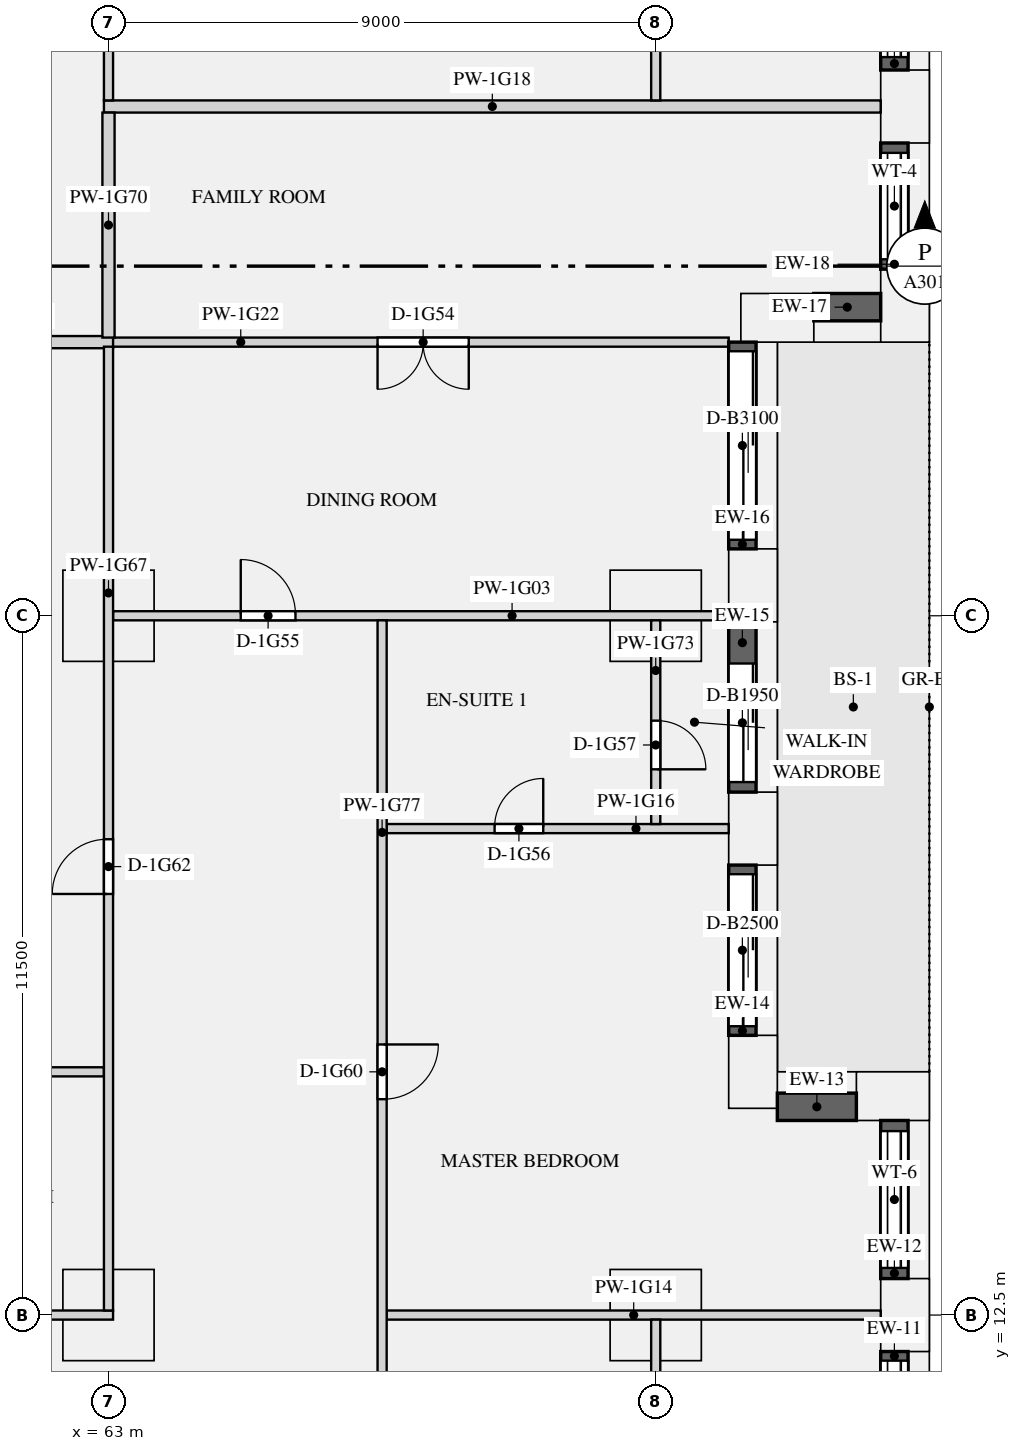
"""IFC4 building model, lengths in metres.
Left out: names, types, materials, properties, quantities, classifications, styles, units other than length and angle.
Written with IfcOpenShell. Run it as: python <this file> out.ifc"""

import sys

from ifc_helpers import new_model, si_unit, direction, frame, frame_2d, origin, origin_2d, place, context, subcontext, project, spatial, rectangle, extrude, element, fill, save


model = new_model("IFC4")
c1 = context("Model", 3, precision=1e-05, world=origin(), true_north=direction((0.0, 1.0)))
c2 = subcontext(c1, "Body", "Model", "MODEL_VIEW")
j1 = project(units=[si_unit("LENGTHUNIT", "METRE"), si_unit("PLANEANGLEUNIT", "RADIAN")], contexts=[c1])
p1 = place(None, origin())
s1 = spatial("IfcSite", under=j1, at=p1, CompositionType="ELEMENT")
p2 = place(p1, origin())
s2 = spatial("IfcBuilding", under=s1, at=p2, CompositionType="ELEMENT")
p3 = place(p2, frame((0.0, 0.0, 69.9)))
s3 = spatial("IfcBuildingStorey", under=s2, at=p3, CompositionType="ELEMENT", Elevation=69.9)
for number, where, z_axis, x_axis in (
    (1, (76.1, 12.5, 0.0), (0.0, 0.0, 1.0), (0.0, 1.0, 0.0)),
    (2, (75.9, 16.1, 0.0), (0.0, 0.0, 1.0), (-1.0, 0.0, 0.0)),
    (3, (73.6, 16.5, 0.0), (0.0, 0.0, 1.0), (0.0, 1.0, 0.0)),
    (4, (73.6, 20.5, 0.0), (0.0, 0.0, 1.0), (0.0, 1.0, 0.0)),
    (5, (73.6, 24.5, 0.0), (0.0, 0.0, 1.0), (0.0, 1.0, 0.0)),
    (6, (74.0, 28.9, 0.0), (0.0, 0.0, 1.0), (1.0, 0.0, 0.0)),
    (7, (76.1, 29.1, 0.0), (0.0, 0.0, 1.0), (0.0, 1.0, 0.0)),
):
    element("IfcColumn", number, at=place(p3, frame(where, z_axis=z_axis, x_axis=x_axis)), inside=s3, PredefinedType="USERDEFINED", context=c2, shape_type="SweptSolid", body=[
        extrude(rectangle(XDim=1.2, YDim=0.8, at=origin_2d()), origin(), (0.0, 0.0, 1.0), 3.15),
    ])
p4 = place(p3, frame((76.1, 32.375, 0.0), z_axis=(0.0, 0.0, 1.0), x_axis=(0.0, 1.0, 0.0)))
e8 = element("IfcColumn", 8, at=p4, inside=s3, PredefinedType="USERDEFINED", context=c2, shape_type="SweptSolid", body=[
    extrude(rectangle(XDim=1.2, YDim=0.8, at=origin_2d()), origin(), (0.0, 0.0, 1.0), 2.65),
])
for number, where, z_axis, x_axis in (
    (9, (63.0, 24.0, 0.0), (0.0, 0.0, 1.0), (1.0, 0.0, 0.0)),
    (10, (72.0, 24.0, 0.0), (0.0, 0.0, 1.0), (1.0, 0.0, 0.0)),
    (11, (63.0, 12.5, 0.0), (0.0, 0.0, 1.0), (1.0, 0.0, 0.0)),
    (12, (72.0, 12.5, 0.0), (0.0, 0.0, 1.0), (1.0, 0.0, 0.0)),
):
    element("IfcColumn", number, at=place(p3, frame(where, z_axis=z_axis, x_axis=x_axis)), inside=s3, PredefinedType="COLUMN", context=c2, shape_type="SweptSolid", body=[
        extrude(rectangle(XDim=1.5, YDim=1.5, at=origin_2d()), origin(), (0.0, 0.0, 1.0), 3.15),
    ])
p5 = place(p3, frame((75.925, 9.1, 0.9), z_axis=(0.0, 0.0, 1.0), x_axis=(0.0, 1.0, 0.0)))
e13 = element("IfcWall", 13, at=p5, inside=s3, PredefinedType="SOLIDWALL", context=c2, shape_type="SweptSolid", body=[
    extrude(rectangle(XDim=2.8, YDim=0.45, at=frame_2d((1.4, 0.0))), origin(), (0.0, 0.0, 1.0), 1.75),
])
p6 = place(p5, frame((0.15, 0.0, 0.15)))
e14 = element("IfcOpeningElement", 14, at=p6, cuts=e13, PredefinedType="OPENING", context=c2, shape_type="SweptSolid", body=[
    extrude(rectangle(XDim=2.5, YDim=1.5, at=frame_2d((1.25, 0.75))), frame((0.0, 0.235, 0.0), z_axis=(0.0, -1.0, 0.0), x_axis=(1.0, 0.0, 0.0)), (0.0, 0.0, 1.0), 0.47),
])
p7 = place(p3, frame((75.925, 13.1, 0.9), z_axis=(0.0, 0.0, 1.0), x_axis=(0.0, 1.0, 0.0)))
e15 = element("IfcWall", 15, at=p7, inside=s3, PredefinedType="SOLIDWALL", context=c2, shape_type="SweptSolid", body=[
    extrude(rectangle(XDim=2.6, YDim=0.45, at=frame_2d((1.3, 0.0))), origin(), (0.0, 0.0, 1.0), 1.75),
])
p8 = place(p7, frame((0.175, 0.0, 0.15)))
e16 = element("IfcOpeningElement", 16, at=p8, cuts=e15, PredefinedType="OPENING", context=c2, shape_type="SweptSolid", body=[
    extrude(rectangle(XDim=2.25, YDim=1.5, at=frame_2d((1.125, 0.75))), frame((0.0, 0.235, 0.0), z_axis=(0.0, -1.0, 0.0), x_axis=(1.0, 0.0, 0.0)), (0.0, 0.0, 1.0), 0.47),
])
p9 = place(p3, frame((75.3, 15.925, 0.9), z_axis=(0.0, 0.0, 1.0), x_axis=(-1.0, 0.0, 0.0)))
e17 = element("IfcWall", 17, at=p9, inside=s3, PredefinedType="SOLIDWALL", context=c2, shape_type="SweptSolid", body=[
    extrude(rectangle(XDim=1.3, YDim=0.45, at=frame_2d((0.65, 0.0))), origin(), (0.0, 0.0, 1.0), 1.75),
])
p10 = place(p3, frame((73.425, 17.1, 0.0), z_axis=(0.0, 0.0, 1.0), x_axis=(0.0, 1.0, 0.0)))
e18 = element("IfcWall", 18, at=p10, inside=s3, PredefinedType="SOLIDWALL", context=c2, shape_type="SweptSolid", body=[
    extrude(rectangle(XDim=2.8, YDim=0.45, at=frame_2d((1.4, 0.0))), origin(), (0.0, 0.0, 1.0), 2.65),
])
p11 = place(p10, frame((0.15, 0.0, 0.0)))
e19 = element("IfcOpeningElement", 19, at=p11, cuts=e18, PredefinedType="OPENING", context=c2, shape_type="SweptSolid", body=[
    extrude(rectangle(XDim=2.5, YDim=2.3, at=frame_2d((1.25, 1.15))), frame((0.0, 0.235, 0.0), z_axis=(0.0, -1.0, 0.0), x_axis=(1.0, 0.0, 0.0)), (0.0, 0.0, 1.0), 0.47),
])
p12 = place(p3, frame((73.425, 21.1, 0.0), z_axis=(0.0, 0.0, 1.0), x_axis=(0.0, 1.0, 0.0)))
e20 = element("IfcWall", 20, at=p12, inside=s3, PredefinedType="SOLIDWALL", context=c2, shape_type="SweptSolid", body=[
    extrude(rectangle(XDim=2.8, YDim=0.45, at=frame_2d((1.4, 0.0))), origin(), (0.0, 0.0, 1.0), 2.65),
])
p13 = place(p12, frame((0.165, 0.0, 0.0)))
e21 = element("IfcOpeningElement", 21, at=p13, cuts=e20, PredefinedType="OPENING", context=c2, shape_type="SweptSolid", body=[
    extrude(rectangle(XDim=1.95, YDim=2.3, at=frame_2d((0.975, 1.15))), frame((0.0, 0.235, 0.0), z_axis=(0.0, -1.0, 0.0), x_axis=(1.0, 0.0, 0.0)), (0.0, 0.0, 1.0), 0.47),
])
p14 = place(p3, frame((73.425, 25.1, 0.0), z_axis=(0.0, 0.0, 1.0), x_axis=(0.0, 1.0, 0.0)))
e22 = element("IfcWall", 22, at=p14, inside=s3, PredefinedType="SOLIDWALL", context=c2, shape_type="SweptSolid", body=[
    extrude(rectangle(XDim=3.4, YDim=0.45, at=frame_2d((1.7, 0.0))), origin(), (0.0, 0.0, 1.0), 2.65),
])
p15 = place(p14, frame((0.15, 0.0, 0.0)))
e23 = element("IfcOpeningElement", 23, at=p15, cuts=e22, PredefinedType="OPENING", context=c2, shape_type="SweptSolid", body=[
    extrude(rectangle(XDim=3.1, YDim=2.3, at=frame_2d((1.55, 1.15))), frame((0.0, 0.235, 0.0), z_axis=(0.0, -1.0, 0.0), x_axis=(1.0, 0.0, 0.0)), (0.0, 0.0, 1.0), 0.47),
])
p16 = place(p3, frame((74.6, 29.075, 0.9), z_axis=(0.0, 0.0, 1.0), x_axis=(1.0, 0.0, 0.0)))
e24 = element("IfcWall", 24, at=p16, inside=s3, PredefinedType="SOLIDWALL", context=c2, shape_type="SweptSolid", body=[
    extrude(rectangle(XDim=1.1, YDim=0.45, at=frame_2d((0.55, 0.0))), origin(), (0.0, 0.0, 1.0), 1.75),
])
p17 = place(p3, frame((75.925, 29.7, 0.9), z_axis=(0.0, 0.0, 1.0), x_axis=(0.0, 1.0, 0.0)))
e25 = element("IfcWall", 25, at=p17, inside=s3, PredefinedType="SOLIDWALL", context=c2, shape_type="SweptSolid", body=[
    extrude(rectangle(XDim=2.075, YDim=0.45, at=frame_2d((1.038, 0.0))), origin(), (0.0, 0.0, 1.0), 1.75),
])
p18 = place(p17, frame((0.163, 0.0, 0.15)))
e26 = element("IfcOpeningElement", 26, at=p18, cuts=e25, PredefinedType="OPENING", context=c2, shape_type="SweptSolid", body=[
    extrude(rectangle(XDim=1.75, YDim=1.5, at=frame_2d((0.875, 0.75))), frame((0.0, 0.235, 0.0), z_axis=(0.0, -1.0, 0.0), x_axis=(1.0, 0.0, 0.0)), (0.0, 0.0, 1.0), 0.47),
])
p19 = place(p3, frame((75.925, 32.975, 0.9), z_axis=(0.0, 0.0, 1.0), x_axis=(0.0, 1.0, 0.0)))
e27 = element("IfcWall", 27, at=p19, inside=s3, PredefinedType="SOLIDWALL", context=c2, shape_type="SweptSolid", body=[
    extrude(rectangle(XDim=2.675, YDim=0.45, at=frame_2d((1.337, 0.0))), origin(), (0.0, 0.0, 1.0), 1.75),
])
p20 = place(p19, frame((0.212, 0.0, 0.15)))
e28 = element("IfcOpeningElement", 28, at=p20, cuts=e27, PredefinedType="OPENING", context=c2, shape_type="SweptSolid", body=[
    extrude(rectangle(XDim=2.25, YDim=1.5, at=frame_2d((1.125, 0.75))), frame((0.0, 0.235, 0.0), z_axis=(0.0, -1.0, 0.0), x_axis=(1.0, 0.0, 0.0)), (0.0, 0.0, 1.0), 0.47),
])
p21 = place(p3, frame((63.075, 24.0, 0.0), z_axis=(0.0, 0.0, 1.0), x_axis=(1.0, 0.0, 0.0)))
e29 = element("IfcWall", 29, at=p21, inside=s3, PredefinedType="PARTITIONING", context=c2, shape_type="SweptSolid", body=[
    extrude(rectangle(XDim=10.125, YDim=0.15, at=frame_2d((5.062, 0.0))), origin(), (0.0, 0.0, 1.0), 2.65),
])
p22 = place(p21, frame((2.1, 0.0, 0.0)))
e30 = element("IfcOpeningElement", 30, at=p22, cuts=e29, PredefinedType="OPENING", context=c2, shape_type="SweptSolid", body=[
    extrude(rectangle(XDim=0.9, YDim=2.1, at=frame_2d((0.45, 1.05))), frame((0.0, 0.085, 0.0), z_axis=(0.0, -1.0, 0.0), x_axis=(1.0, 0.0, 0.0)), (0.0, 0.0, 1.0), 0.17),
])
p23 = place(p3, frame((58.425, 12.5, 0.0), z_axis=(0.0, 0.0, 1.0), x_axis=(1.0, 0.0, 0.0)))
e31 = element("IfcWall", 31, at=p23, inside=s3, PredefinedType="PARTITIONING", context=c2, shape_type="SweptSolid", body=[
    extrude(rectangle(XDim=4.65, YDim=0.15, at=frame_2d((2.325, 0.0))), origin(), (0.0, 0.0, 1.0), 2.65),
])
p24 = place(p3, frame((67.575, 12.5, 0.0), z_axis=(0.0, 0.0, 1.0), x_axis=(1.0, 0.0, 0.0)))
e32 = element("IfcWall", 32, at=p24, inside=s3, PredefinedType="PARTITIONING", context=c2, shape_type="SweptSolid", body=[
    extrude(rectangle(XDim=8.125, YDim=0.15, at=frame_2d((4.062, 0.0))), origin(), (0.0, 0.0, 1.0), 2.65),
])
p25 = place(p3, frame((67.575, 20.5, 0.0), z_axis=(0.0, 0.0, 1.0), x_axis=(1.0, 0.0, 0.0)))
e33 = element("IfcWall", 33, at=p25, inside=s3, PredefinedType="PARTITIONING", context=c2, shape_type="SweptSolid", body=[
    extrude(rectangle(XDim=5.625, YDim=0.15, at=frame_2d((2.812, 0.0))), origin(), (0.0, 0.0, 1.0), 2.65),
])
p26 = place(p25, frame((1.775, 0.0, 0.0)))
e34 = element("IfcOpeningElement", 34, at=p26, cuts=e33, PredefinedType="OPENING", context=c2, shape_type="SweptSolid", body=[
    extrude(rectangle(XDim=0.8, YDim=2.1, at=frame_2d((0.4, 1.05))), frame((0.0, 0.085, 0.0), z_axis=(0.0, -1.0, 0.0), x_axis=(1.0, 0.0, 0.0)), (0.0, 0.0, 1.0), 0.17),
])
p27 = place(p3, frame((62.925, 32.375, 0.0), z_axis=(0.0, 0.0, 1.0), x_axis=(1.0, 0.0, 0.0)))
e35 = element("IfcWall", 35, at=p27, inside=s3, PredefinedType="PARTITIONING", context=c2, shape_type="SweptSolid", body=[
    extrude(rectangle(XDim=12.775, YDim=0.2, at=frame_2d((6.387, 0.0))), origin(), (0.0, 0.0, 1.0), 2.65),
])
p28 = place(p3, frame((58.575, 16.5, 0.0), z_axis=(0.0, 0.0, 1.0), x_axis=(1.0, 0.0, 0.0)))
e36 = element("IfcWall", 36, at=p28, inside=s3, PredefinedType="PARTITIONING", context=c2, shape_type="SweptSolid", body=[
    extrude(rectangle(XDim=4.35, YDim=0.15, at=frame_2d((2.175, 0.0))), origin(), (0.0, 0.0, 1.0), 2.65),
])
p29 = place(p3, frame((62.925, 28.5, 0.0), z_axis=(0.0, 0.0, 1.0), x_axis=(1.0, 0.0, 0.0)))
e37 = element("IfcWall", 37, at=p29, inside=s3, PredefinedType="PARTITIONING", context=c2, shape_type="SweptSolid", body=[
    extrude(rectangle(XDim=10.275, YDim=0.15, at=frame_2d((5.137, 0.0))), origin(), (0.0, 0.0, 1.0), 2.65),
])
p30 = place(p29, frame((4.5, 0.0, 0.0)))
e38 = element("IfcOpeningElement", 38, at=p30, cuts=e37, PredefinedType="OPENING", context=c2, shape_type="SweptSolid", body=[
    extrude(rectangle(XDim=1.5, YDim=2.1, at=frame_2d((0.75, 1.05))), frame((0.0, 0.085, 0.0), z_axis=(0.0, -1.0, 0.0), x_axis=(1.0, 0.0, 0.0)), (0.0, 0.0, 1.0), 0.17),
])
p31 = place(p3, frame((59.8, 28.5, 0.0), z_axis=(0.0, 0.0, 1.0), x_axis=(1.0, 0.0, 0.0)))
e39 = element("IfcWall", 39, at=p31, inside=s3, PredefinedType="PARTITIONING", context=c2, shape_type="SweptSolid", body=[
    extrude(rectangle(XDim=3.275, YDim=0.2, at=frame_2d((1.637, 0.0))), origin(), (0.0, 0.0, 1.0), 2.65),
])
p32 = place(p3, frame((63.0, 12.575, 0.0), z_axis=(0.0, 0.0, 1.0), x_axis=(0.0, 1.0, 0.0)))
e40 = element("IfcWall", 40, at=p32, inside=s3, PredefinedType="PARTITIONING", context=c2, shape_type="SweptSolid", body=[
    extrude(rectangle(XDim=15.85, YDim=0.15, at=frame_2d((7.925, 0.0))), origin(), (0.0, 0.0, 1.0), 2.65),
])
p33 = place(p32, frame((6.85, 0.0, 0.0)))
e41 = element("IfcOpeningElement", 41, at=p33, cuts=e40, PredefinedType="OPENING", context=c2, shape_type="SweptSolid", body=[
    extrude(rectangle(XDim=0.9, YDim=2.1, at=frame_2d((0.45, 1.05))), frame((0.0, 0.085, 0.0), z_axis=(0.0, -1.0, 0.0), x_axis=(1.0, 0.0, 0.0)), (0.0, 0.0, 1.0), 0.17),
])
p34 = place(p3, frame((63.0, 32.475, 0.0), z_axis=(0.0, 0.0, 1.0), x_axis=(0.0, 1.0, 0.0)))
e42 = element("IfcWall", 42, at=p34, inside=s3, PredefinedType="PARTITIONING", context=c2, shape_type="SweptSolid", body=[
    extrude(rectangle(XDim=7.575, YDim=0.15, at=frame_2d((3.788, 0.0))), origin(), (0.0, 0.0, 1.0), 2.65),
])
p35 = place(p3, frame((63.0, 28.575, 0.0), z_axis=(0.0, 0.0, 1.0), x_axis=(0.0, 1.0, 0.0)))
e43 = element("IfcWall", 43, at=p35, inside=s3, PredefinedType="PARTITIONING", context=c2, shape_type="SweptSolid", body=[
    extrude(rectangle(XDim=3.7, YDim=0.2, at=frame_2d((1.85, 0.0))), origin(), (0.0, 0.0, 1.0), 2.65),
])
p36 = place(p3, frame((72.0, 8.575, 0.0), z_axis=(0.0, 0.0, 1.0), x_axis=(0.0, 1.0, 0.0)))
e44 = element("IfcWall", 44, at=p36, inside=s3, PredefinedType="PARTITIONING", context=c2, shape_type="SweptSolid", body=[
    extrude(rectangle(XDim=3.85, YDim=0.15, at=frame_2d((1.925, 0.0))), origin(), (0.0, 0.0, 1.0), 2.65),
])
p37 = place(p3, frame((72.0, 20.575, 0.0), z_axis=(0.0, 0.0, 1.0), x_axis=(0.0, 1.0, 0.0)))
e45 = element("IfcWall", 45, at=p37, inside=s3, PredefinedType="PARTITIONING", context=c2, shape_type="SweptSolid", body=[
    extrude(rectangle(XDim=3.35, YDim=0.15, at=frame_2d((1.675, 0.0))), origin(), (0.0, 0.0, 1.0), 2.65),
])
p38 = place(p37, frame((0.9, 0.0, 0.0)))
e46 = element("IfcOpeningElement", 46, at=p38, cuts=e45, PredefinedType="OPENING", context=c2, shape_type="SweptSolid", body=[
    extrude(rectangle(XDim=0.8, YDim=2.1, at=frame_2d((0.4, 1.05))), frame((0.0, 0.085, 0.0), z_axis=(0.0, -1.0, 0.0), x_axis=(1.0, 0.0, 0.0)), (0.0, 0.0, 1.0), 0.17),
])
p39 = place(p3, frame((72.0, 32.475, 0.0), z_axis=(0.0, 0.0, 1.0), x_axis=(0.0, 1.0, 0.0)))
e47 = element("IfcWall", 47, at=p39, inside=s3, PredefinedType="PARTITIONING", context=c2, shape_type="SweptSolid", body=[
    extrude(rectangle(XDim=7.575, YDim=0.15, at=frame_2d((3.788, 0.0))), origin(), (0.0, 0.0, 1.0), 2.65),
])
p40 = place(p39, frame((4.963, 0.0, 0.0)))
e48 = element("IfcOpeningElement", 48, at=p40, cuts=e47, PredefinedType="OPENING", context=c2, shape_type="SweptSolid", body=[
    extrude(rectangle(XDim=1.5, YDim=2.1, at=frame_2d((0.75, 1.05))), frame((0.0, 0.085, 0.0), z_axis=(0.0, -1.0, 0.0), x_axis=(1.0, 0.0, 0.0)), (0.0, 0.0, 1.0), 0.17),
])
p41 = place(p3, frame((67.5, 8.575, 0.0), z_axis=(0.0, 0.0, 1.0), x_axis=(0.0, 1.0, 0.0)))
e49 = element("IfcWall", 49, at=p41, inside=s3, PredefinedType="PARTITIONING", context=c2, shape_type="SweptSolid", body=[
    extrude(rectangle(XDim=15.35, YDim=0.15, at=frame_2d((7.675, 0.0))), origin(), (0.0, 0.0, 1.0), 2.65),
])
p42 = place(p41, frame((7.475, 0.0, 0.0)))
e50 = element("IfcOpeningElement", 50, at=p42, cuts=e49, PredefinedType="OPENING", context=c2, shape_type="SweptSolid", body=[
    extrude(rectangle(XDim=0.9, YDim=2.1, at=frame_2d((0.45, 1.05))), frame((0.0, 0.085, 0.0), z_axis=(0.0, -1.0, 0.0), x_axis=(1.0, 0.0, 0.0)), (0.0, 0.0, 1.0), 0.17),
])
p43 = place(p41, frame((1.475, 0.0, 0.0)))
e51 = element("IfcOpeningElement", 51, at=p43, cuts=e49, PredefinedType="OPENING", context=c2, shape_type="SweptSolid", body=[
    extrude(rectangle(XDim=0.9, YDim=2.1, at=frame_2d((0.45, 1.05))), frame((0.0, 0.085, 0.0), z_axis=(0.0, -1.0, 0.0), x_axis=(1.0, 0.0, 0.0)), (0.0, 0.0, 1.0), 0.17),
])
p44 = place(p6, origin())
e52 = element("IfcWindow", 52, at=p44, inside=s3, PartitioningType="SINGLE_PANEL", PredefinedType="WINDOW", context=c2, shape_type="SweptSolid", body=[
    extrude(rectangle(XDim=2.5, YDim=1.5, at=frame_2d((1.25, 0.75))), frame((0.0, -0.065, 0.0), z_axis=(0.0, -1.0, 0.0), x_axis=(1.0, 0.0, 0.0)), (0.0, 0.0, 1.0), 0.06),
])
fill(e14, e52)
p45 = place(p8, origin())
e53 = element("IfcWindow", 53, at=p45, inside=s3, PartitioningType="SINGLE_PANEL", PredefinedType="WINDOW", context=c2, shape_type="SweptSolid", body=[
    extrude(rectangle(XDim=2.25, YDim=1.5, at=frame_2d((1.125, 0.75))), frame((0.0, -0.065, 0.0), z_axis=(0.0, -1.0, 0.0), x_axis=(1.0, 0.0, 0.0)), (0.0, 0.0, 1.0), 0.06),
])
fill(e16, e53)
p46 = place(p11, origin())
e54 = element("IfcDoor", 54, at=p46, inside=s3, OperationType="SLIDING_TO_LEFT", PredefinedType="DOOR", context=c2, shape_type="SweptSolid", body=[
    extrude(rectangle(XDim=2.5, YDim=2.3, at=frame_2d((1.25, 1.15))), frame((0.0, -0.07, 0.0), z_axis=(0.0, -1.0, 0.0), x_axis=(1.0, 0.0, 0.0)), (0.0, 0.0, 1.0), 0.05),
])
fill(e19, e54)
p47 = place(p13, origin())
e55 = element("IfcDoor", 55, at=p47, inside=s3, OperationType="SLIDING_TO_LEFT", PredefinedType="DOOR", context=c2, shape_type="SweptSolid", body=[
    extrude(rectangle(XDim=1.95, YDim=2.3, at=frame_2d((0.975, 1.15))), frame((0.0, -0.07, 0.0), z_axis=(0.0, -1.0, 0.0), x_axis=(1.0, 0.0, 0.0)), (0.0, 0.0, 1.0), 0.05),
])
fill(e21, e55)
p48 = place(p15, origin())
e56 = element("IfcDoor", 56, at=p48, inside=s3, OperationType="SLIDING_TO_LEFT", PredefinedType="DOOR", context=c2, shape_type="SweptSolid", body=[
    extrude(rectangle(XDim=3.1, YDim=2.3, at=frame_2d((1.55, 1.15))), frame((0.0, -0.07, 0.0), z_axis=(0.0, -1.0, 0.0), x_axis=(1.0, 0.0, 0.0)), (0.0, 0.0, 1.0), 0.05),
])
fill(e23, e56)
p49 = place(p18, origin())
e57 = element("IfcWindow", 57, at=p49, inside=s3, PartitioningType="SINGLE_PANEL", PredefinedType="WINDOW", context=c2, shape_type="SweptSolid", body=[
    extrude(rectangle(XDim=1.75, YDim=1.5, at=frame_2d((0.875, 0.75))), frame((0.0, -0.065, 0.0), z_axis=(0.0, -1.0, 0.0), x_axis=(1.0, 0.0, 0.0)), (0.0, 0.0, 1.0), 0.06),
])
fill(e26, e57)
p50 = place(p20, origin())
e58 = element("IfcWindow", 58, at=p50, inside=s3, PartitioningType="SINGLE_PANEL", PredefinedType="WINDOW", context=c2, shape_type="SweptSolid", body=[
    extrude(rectangle(XDim=2.25, YDim=1.5, at=frame_2d((1.125, 0.75))), frame((0.0, -0.065, 0.0), z_axis=(0.0, -1.0, 0.0), x_axis=(1.0, 0.0, 0.0)), (0.0, 0.0, 1.0), 0.06),
])
fill(e28, e58)
p51 = place(p30, frame((1.5, 0.0, 0.0), z_axis=(0.0, 0.0, 1.0), x_axis=(-1.0, 0.0, 0.0)))
e59 = element("IfcDoor", 59, at=p51, inside=s3, OperationType="DOUBLE_DOOR_SINGLE_SWING", PredefinedType="DOOR", context=c2, shape_type="SweptSolid", body=[
    extrude(rectangle(XDim=1.5, YDim=2.1, at=frame_2d((0.75, 1.05))), frame((0.0, 0.025, 0.0), z_axis=(0.0, -1.0, 0.0), x_axis=(1.0, 0.0, 0.0)), (0.0, 0.0, 1.0), 0.05),
])
fill(e38, e59)
p52 = place(p22, origin())
e60 = element("IfcDoor", 60, at=p52, inside=s3, OperationType="SINGLE_SWING_LEFT", PredefinedType="DOOR", context=c2, shape_type="SweptSolid", body=[
    extrude(rectangle(XDim=0.9, YDim=2.1, at=frame_2d((0.45, 1.05))), frame((0.0, 0.025, 0.0), z_axis=(0.0, -1.0, 0.0), x_axis=(1.0, 0.0, 0.0)), (0.0, 0.0, 1.0), 0.05),
])
fill(e30, e60)
p53 = place(p26, origin())
e61 = element("IfcDoor", 61, at=p53, inside=s3, OperationType="SINGLE_SWING_RIGHT", PredefinedType="DOOR", context=c2, shape_type="SweptSolid", body=[
    extrude(rectangle(XDim=0.8, YDim=2.1, at=frame_2d((0.4, 1.05))), frame((0.0, 0.025, 0.0), z_axis=(0.0, -1.0, 0.0), x_axis=(1.0, 0.0, 0.0)), (0.0, 0.0, 1.0), 0.05),
])
fill(e34, e61)
p54 = place(p38, frame((0.8, 0.0, 0.0), z_axis=(0.0, 0.0, 1.0), x_axis=(-1.0, 0.0, 0.0)))
e62 = element("IfcDoor", 62, at=p54, inside=s3, OperationType="SINGLE_SWING_RIGHT", PredefinedType="DOOR", context=c2, shape_type="SweptSolid", body=[
    extrude(rectangle(XDim=0.8, YDim=2.1, at=frame_2d((0.4, 1.05))), frame((0.0, 0.025, 0.0), z_axis=(0.0, -1.0, 0.0), x_axis=(1.0, 0.0, 0.0)), (0.0, 0.0, 1.0), 0.05),
])
fill(e46, e62)
p55 = place(p42, frame((0.9, 0.0, 0.0), z_axis=(0.0, 0.0, 1.0), x_axis=(-1.0, 0.0, 0.0)))
e63 = element("IfcDoor", 63, at=p55, inside=s3, OperationType="SINGLE_SWING_LEFT", PredefinedType="DOOR", context=c2, shape_type="SweptSolid", body=[
    extrude(rectangle(XDim=0.9, YDim=2.1, at=frame_2d((0.45, 1.05))), frame((0.0, 0.025, 0.0), z_axis=(0.0, -1.0, 0.0), x_axis=(1.0, 0.0, 0.0)), (0.0, 0.0, 1.0), 0.05),
])
fill(e50, e63)
p56 = place(p33, origin())
e64 = element("IfcDoor", 64, at=p56, inside=s3, OperationType="SINGLE_SWING_LEFT", PredefinedType="DOOR", context=c2, shape_type="SweptSolid", body=[
    extrude(rectangle(XDim=0.9, YDim=2.1, at=frame_2d((0.45, 1.05))), frame((0.0, 0.025, 0.0), z_axis=(0.0, -1.0, 0.0), x_axis=(1.0, 0.0, 0.0)), (0.0, 0.0, 1.0), 0.05),
])
fill(e41, e64)
save(model, sys.argv[1])
